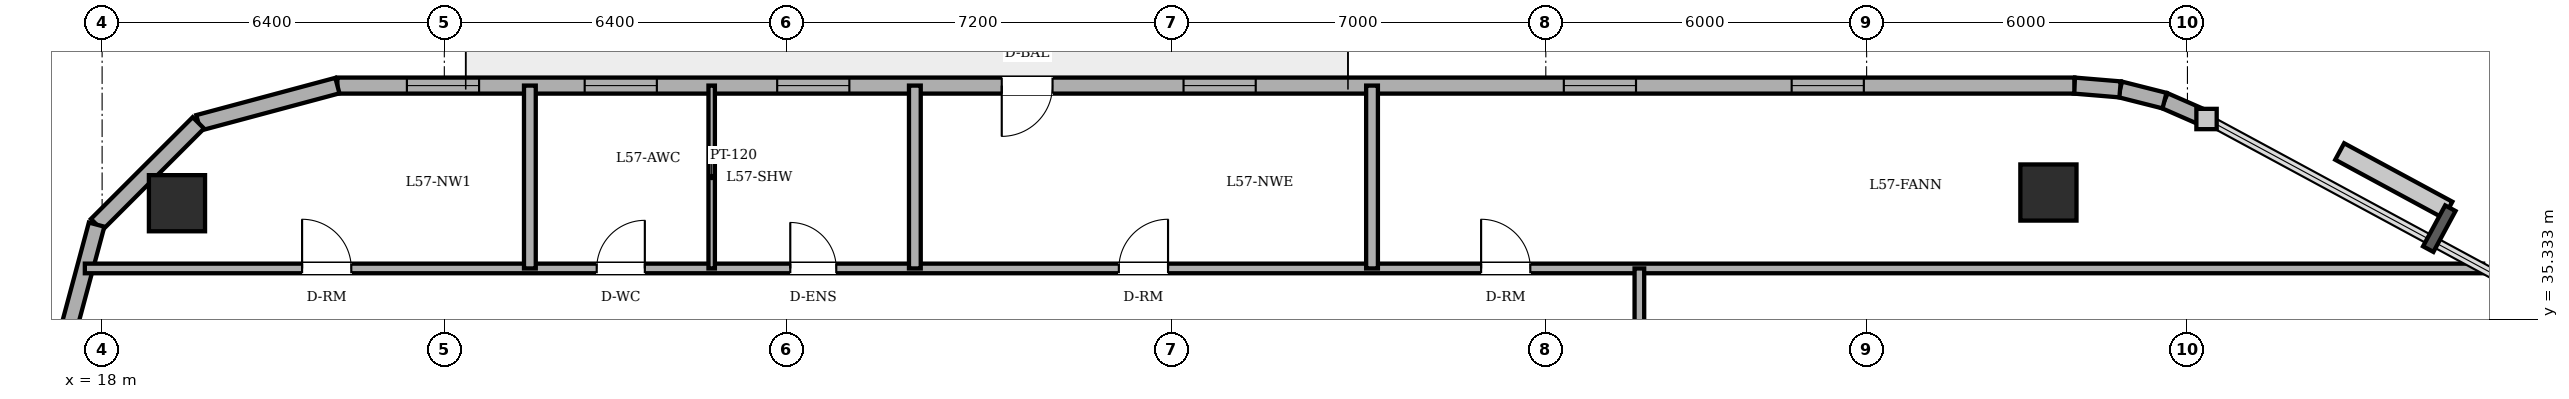
"""IFC4 building model, lengths in metres.
Left out: names, types, materials, properties, quantities, classifications, styles, units other than length and angle.
Written with IfcOpenShell. Run it as: python <this file> out.ifc"""

import sys

from ifc_helpers import new_model, si_unit, direction, frame, frame_2d, origin, origin_2d, place, context, subcontext, project, spatial, rectangle, circle, extrude, element, fill, save


model = new_model("IFC4")
c1 = context("Model", 3, precision=1e-05, world=origin(), true_north=direction((0.0, 1.0)))
c2 = subcontext(c1, "Body", "Model", "MODEL_VIEW")
j1 = project(units=[si_unit("LENGTHUNIT", "METRE"), si_unit("PLANEANGLEUNIT", "RADIAN")], contexts=[c1])
p1 = place(None, origin())
s1 = spatial("IfcSite", under=j1, at=p1, CompositionType="ELEMENT")
p2 = place(p1, origin())
s2 = spatial("IfcBuilding", under=s1, at=p2, CompositionType="ELEMENT")
p3 = place(p2, frame((0.0, 0.0, 219.3)))
s3 = spatial("IfcBuildingStorey", under=s2, at=p3, CompositionType="ELEMENT", Elevation=219.3)
for number, where, z_axis, x_axis in (
    (1, (54.4, 37.7, 0.0), (0.0, 0.0, 1.0), (1.0, 0.0, 0.0)),
    (2, (19.4, 37.5, 0.0), (0.0, 0.0, 1.0), (1.0, 0.0, 0.0)),
):
    element("IfcColumn", number, at=place(p3, frame(where, z_axis=z_axis, x_axis=x_axis)), inside=s3, PredefinedType="COLUMN", context=c2, shape_type="SweptSolid", body=[
        extrude(circle(Radius=0.525, at=origin_2d()), origin(), (0.0, 0.0, 1.0), 3.6),
    ])
p4 = place(p3, frame((57.357, 39.075, 0.0), z_axis=(0.0, 0.0, 1.0), x_axis=(-0.916085473636, 0.400983048261, 0.0)))
e3 = element("IfcWall", 3, at=p4, inside=s3, PredefinedType="SOLIDWALL", context=c2, shape_type="SweptSolid", body=[
    extrude(rectangle(XDim=0.858, YDim=0.3, at=frame_2d((0.429, 0.0))), origin(), (0.0, 0.0, 1.0), 3.4),
])
p5 = place(p3, frame((56.571, 39.419, 0.0), z_axis=(0.0, 0.0, 1.0), x_axis=(-0.969536346338, 0.244947490555, 0.0)))
e4 = element("IfcWall", 4, at=p5, inside=s3, PredefinedType="SOLIDWALL", context=c2, shape_type="SweptSolid", body=[
    extrude(rectangle(XDim=0.857, YDim=0.3, at=frame_2d((0.429, 0.0))), origin(), (0.0, 0.0, 1.0), 3.4),
])
p6 = place(p3, frame((55.74, 39.629, 0.0), z_axis=(0.0, 0.0, 1.0), x_axis=(-0.996565355958, 0.082809971041, 0.0)))
e5 = element("IfcWall", 5, at=p6, inside=s3, PredefinedType="SOLIDWALL", context=c2, shape_type="SweptSolid", body=[
    extrude(rectangle(XDim=0.858, YDim=0.3, at=frame_2d((0.429, 0.0))), origin(), (0.0, 0.0, 1.0), 3.4),
])
p7 = place(p3, frame((54.885, 39.7, 0.0), z_axis=(0.0, 0.0, 1.0), x_axis=(-1.0, 0.0, 0.0)))
e6 = element("IfcWall", 6, at=p7, inside=s3, PredefinedType="SOLIDWALL", context=c2, shape_type="SweptSolid", body=[
    extrude(rectangle(XDim=32.485, YDim=0.3, at=frame_2d((16.243, 0.0))), origin(), (0.0, 0.0, 1.0), 3.4),
])
p8 = place(p7, frame((19.11, 0.0, 0.0)))
e7 = element("IfcOpeningElement", 7, at=p8, cuts=e6, PredefinedType="OPENING", context=c2, shape_type="SweptSolid", body=[
    extrude(rectangle(XDim=0.95, YDim=2.2, at=frame_2d((0.475, 1.1))), frame((0.0, 0.16, 0.0), z_axis=(0.0, -1.0, 0.0), x_axis=(1.0, 0.0, 0.0)), (0.0, 0.0, 1.0), 0.32),
])
p9 = place(p7, frame((3.937, 0.0, 0.85)))
e8 = element("IfcOpeningElement", 8, at=p9, cuts=e6, PredefinedType="OPENING", context=c2, shape_type="SweptSolid", body=[
    extrude(rectangle(XDim=1.35, YDim=1.55, at=frame_2d((0.675, 0.775))), frame((0.0, 0.16, 0.0), z_axis=(0.0, -1.0, 0.0), x_axis=(1.0, 0.0, 0.0)), (0.0, 0.0, 1.0), 0.32),
])
p10 = place(p7, frame((8.198, 0.0, 0.85)))
e9 = element("IfcOpeningElement", 9, at=p10, cuts=e6, PredefinedType="OPENING", context=c2, shape_type="SweptSolid", body=[
    extrude(rectangle(XDim=1.35, YDim=1.55, at=frame_2d((0.675, 0.775))), frame((0.0, 0.16, 0.0), z_axis=(0.0, -1.0, 0.0), x_axis=(1.0, 0.0, 0.0)), (0.0, 0.0, 1.0), 0.32),
])
p11 = place(p7, frame((15.31, 0.0, 0.85)))
e10 = element("IfcOpeningElement", 10, at=p11, cuts=e6, PredefinedType="OPENING", context=c2, shape_type="SweptSolid", body=[
    extrude(rectangle(XDim=1.35, YDim=1.55, at=frame_2d((0.675, 0.775))), frame((0.0, 0.16, 0.0), z_axis=(0.0, -1.0, 0.0), x_axis=(1.0, 0.0, 0.0)), (0.0, 0.0, 1.0), 0.32),
])
p12 = place(p7, frame((22.91, 0.0, 0.85)))
e11 = element("IfcOpeningElement", 11, at=p12, cuts=e6, PredefinedType="OPENING", context=c2, shape_type="SweptSolid", body=[
    extrude(rectangle(XDim=1.35, YDim=1.55, at=frame_2d((0.675, 0.775))), frame((0.0, 0.16, 0.0), z_axis=(0.0, -1.0, 0.0), x_axis=(1.0, 0.0, 0.0)), (0.0, 0.0, 1.0), 0.32),
])
p13 = place(p7, frame((26.51, 0.0, 0.85)))
e12 = element("IfcOpeningElement", 12, at=p13, cuts=e6, PredefinedType="OPENING", context=c2, shape_type="SweptSolid", body=[
    extrude(rectangle(XDim=1.35, YDim=1.55, at=frame_2d((0.675, 0.775))), frame((0.0, 0.16, 0.0), z_axis=(0.0, -1.0, 0.0), x_axis=(1.0, 0.0, 0.0)), (0.0, 0.0, 1.0), 0.32),
])
p14 = place(p7, frame((29.835, 0.0, 0.85)))
e13 = element("IfcOpeningElement", 13, at=p14, cuts=e6, PredefinedType="OPENING", context=c2, shape_type="SweptSolid", body=[
    extrude(rectangle(XDim=1.35, YDim=1.55, at=frame_2d((0.675, 0.775))), frame((0.0, 0.16, 0.0), z_axis=(0.0, -1.0, 0.0), x_axis=(1.0, 0.0, 0.0)), (0.0, 0.0, 1.0), 0.32),
])
p15 = place(p3, frame((22.4, 39.7, 0.0), z_axis=(0.0, 0.0, 1.0), x_axis=(-0.965889330541, -0.258955210695, 0.0)))
e14 = element("IfcWall", 14, at=p15, inside=s3, PredefinedType="SOLIDWALL", context=c2, shape_type="SweptSolid", body=[
    extrude(rectangle(XDim=2.692, YDim=0.3, at=frame_2d((1.346, 0.0))), origin(), (0.0, 0.0, 1.0), 3.4),
])
p16 = place(p3, frame((19.8, 39.003, 0.0), z_axis=(0.0, 0.0, 1.0), x_axis=(-0.707152139074, -0.70706142039, 0.0)))
e15 = element("IfcWall", 15, at=p16, inside=s3, PredefinedType="SOLIDWALL", context=c2, shape_type="SweptSolid", body=[
    extrude(rectangle(XDim=2.691, YDim=0.3, at=frame_2d((1.346, 0.0))), origin(), (0.0, 0.0, 1.0), 3.4),
])
p17 = place(p3, frame((17.897, 37.1, 0.0), z_axis=(0.0, 0.0, 1.0), x_axis=(-0.258932525951, -0.965895412042, 0.0)))
e16 = element("IfcWall", 16, at=p17, inside=s3, PredefinedType="SOLIDWALL", context=c2, shape_type="SweptSolid", body=[
    extrude(rectangle(XDim=2.692, YDim=0.3, at=frame_2d((1.346, 0.0))), origin(), (0.0, 0.0, 1.0), 3.4),
])
p18 = place(p3, frame((17.677, 36.28, 0.0), z_axis=(0.0, 0.0, 1.0), x_axis=(1.0, 0.0, 0.0)))
e17 = element("IfcWall", 17, at=p18, inside=s3, PredefinedType="PARTITIONING", context=c2, shape_type="SweptSolid", body=[
    extrude(rectangle(XDim=44.853, YDim=0.18, at=frame_2d((22.427, 0.0))), origin(), (0.0, 0.0, 1.0), 3.4),
])
p19 = place(p18, frame((9.573, 0.0, 0.0)))
e18 = element("IfcOpeningElement", 18, at=p19, cuts=e17, PredefinedType="OPENING", context=c2, shape_type="SweptSolid", body=[
    extrude(rectangle(XDim=0.9, YDim=2.1, at=frame_2d((0.45, 1.05))), frame((0.0, 0.1, 0.0), z_axis=(0.0, -1.0, 0.0), x_axis=(1.0, 0.0, 0.0)), (0.0, 0.0, 1.0), 0.2),
])
p20 = place(p18, frame((13.193, 0.0, 0.0)))
e19 = element("IfcOpeningElement", 19, at=p20, cuts=e17, PredefinedType="OPENING", context=c2, shape_type="SweptSolid", body=[
    extrude(rectangle(XDim=0.86, YDim=2.1, at=frame_2d((0.43, 1.05))), frame((0.0, 0.1, 0.0), z_axis=(0.0, -1.0, 0.0), x_axis=(1.0, 0.0, 0.0)), (0.0, 0.0, 1.0), 0.2),
])
p21 = place(p18, frame((26.113, 0.0, 0.0)))
e20 = element("IfcOpeningElement", 20, at=p21, cuts=e17, PredefinedType="OPENING", context=c2, shape_type="SweptSolid", body=[
    extrude(rectangle(XDim=0.92, YDim=2.1, at=frame_2d((0.46, 1.05))), frame((0.0, 0.1, 0.0), z_axis=(0.0, -1.0, 0.0), x_axis=(1.0, 0.0, 0.0)), (0.0, 0.0, 1.0), 0.2),
])
p22 = place(p18, frame((4.063, 0.0, 0.0)))
e21 = element("IfcOpeningElement", 21, at=p22, cuts=e17, PredefinedType="OPENING", context=c2, shape_type="SweptSolid", body=[
    extrude(rectangle(XDim=0.92, YDim=2.1, at=frame_2d((0.46, 1.05))), frame((0.0, 0.1, 0.0), z_axis=(0.0, -1.0, 0.0), x_axis=(1.0, 0.0, 0.0)), (0.0, 0.0, 1.0), 0.2),
])
p23 = place(p18, frame((19.338, 0.0, 0.0)))
e22 = element("IfcOpeningElement", 22, at=p23, cuts=e17, PredefinedType="OPENING", context=c2, shape_type="SweptSolid", body=[
    extrude(rectangle(XDim=0.92, YDim=2.1, at=frame_2d((0.46, 1.05))), frame((0.0, 0.1, 0.0), z_axis=(0.0, -1.0, 0.0), x_axis=(1.0, 0.0, 0.0)), (0.0, 0.0, 1.0), 0.2),
])
p24 = place(p3, frame((26.0, 36.28, 0.0), z_axis=(0.0, 0.0, 1.0), x_axis=(0.0, 1.0, 0.0)))
e23 = element("IfcWall", 23, at=p24, inside=s3, PredefinedType="PARTITIONING", context=c2, shape_type="SweptSolid", body=[
    extrude(rectangle(XDim=3.42, YDim=0.22, at=frame_2d((1.71, 0.0))), origin(), (0.0, 0.0, 1.0), 3.4),
])
p25 = place(p3, frame((29.4, 36.28, 0.0), z_axis=(0.0, 0.0, 1.0), x_axis=(0.0, 1.0, 0.0)))
e24 = element("IfcWall", 24, at=p25, inside=s3, PredefinedType="PARTITIONING", context=c2, shape_type="SweptSolid", body=[
    extrude(rectangle(XDim=3.42, YDim=0.12, at=frame_2d((1.71, 0.0))), origin(), (0.0, 0.0, 1.0), 3.4),
])
for number, where, z_axis, x_axis in (
    (25, (33.2, 36.28, 0.0), (0.0, 0.0, 1.0), (0.0, 1.0, 0.0)),
    (26, (41.75, 36.28, 0.0), (0.0, 0.0, 1.0), (0.0, 1.0, 0.0)),
):
    element("IfcWall", number, at=place(p3, frame(where, z_axis=z_axis, x_axis=x_axis)), inside=s3, PredefinedType="PARTITIONING", context=c2, shape_type="SweptSolid", body=[
        extrude(rectangle(XDim=3.42, YDim=0.22, at=frame_2d((1.71, 0.0))), origin(), (0.0, 0.0, 1.0), 3.4),
    ])
p26 = place(p3, frame((46.75, 33.82, 0.0), z_axis=(0.0, 0.0, 1.0), x_axis=(0.0, 1.0, 0.0)))
e27 = element("IfcWall", 27, at=p26, inside=s3, PredefinedType="PARTITIONING", context=c2, shape_type="SweptSolid", body=[
    extrude(rectangle(XDim=2.46, YDim=0.18, at=frame_2d((1.23, 0.0))), origin(), (0.0, 0.0, 1.0), 3.4),
])
p27 = place(p8, origin())
e28 = element("IfcDoor", 28, at=p27, inside=s3, OperationType="SINGLE_SWING_RIGHT", PredefinedType="DOOR", context=c2, shape_type="SweptSolid", body=[
    extrude(rectangle(XDim=0.95, YDim=2.2, at=frame_2d((0.475, 1.1))), frame((0.0, 0.025, 0.0), z_axis=(0.0, -1.0, 0.0), x_axis=(1.0, 0.0, 0.0)), (0.0, 0.0, 1.0), 0.05),
])
fill(e7, e28)
p28 = place(p9, origin())
e29 = element("IfcWindow", 29, at=p28, inside=s3, PartitioningType="SINGLE_PANEL", PredefinedType="WINDOW", context=c2, shape_type="SweptSolid", body=[
    extrude(rectangle(XDim=1.35, YDim=1.55, at=frame_2d((0.675, 0.775))), frame((0.0, 0.03, 0.0), z_axis=(0.0, -1.0, 0.0), x_axis=(1.0, 0.0, 0.0)), (0.0, 0.0, 1.0), 0.06),
])
fill(e8, e29)
p29 = place(p10, origin())
e30 = element("IfcWindow", 30, at=p29, inside=s3, PartitioningType="SINGLE_PANEL", PredefinedType="WINDOW", context=c2, shape_type="SweptSolid", body=[
    extrude(rectangle(XDim=1.35, YDim=1.55, at=frame_2d((0.675, 0.775))), frame((0.0, 0.03, 0.0), z_axis=(0.0, -1.0, 0.0), x_axis=(1.0, 0.0, 0.0)), (0.0, 0.0, 1.0), 0.06),
])
fill(e9, e30)
p30 = place(p11, origin())
e31 = element("IfcWindow", 31, at=p30, inside=s3, PartitioningType="SINGLE_PANEL", PredefinedType="WINDOW", context=c2, shape_type="SweptSolid", body=[
    extrude(rectangle(XDim=1.35, YDim=1.55, at=frame_2d((0.675, 0.775))), frame((0.0, 0.03, 0.0), z_axis=(0.0, -1.0, 0.0), x_axis=(1.0, 0.0, 0.0)), (0.0, 0.0, 1.0), 0.06),
])
fill(e10, e31)
p31 = place(p12, origin())
e32 = element("IfcWindow", 32, at=p31, inside=s3, PartitioningType="SINGLE_PANEL", PredefinedType="WINDOW", context=c2, shape_type="SweptSolid", body=[
    extrude(rectangle(XDim=1.35, YDim=1.55, at=frame_2d((0.675, 0.775))), frame((0.0, 0.03, 0.0), z_axis=(0.0, -1.0, 0.0), x_axis=(1.0, 0.0, 0.0)), (0.0, 0.0, 1.0), 0.06),
])
fill(e11, e32)
p32 = place(p13, origin())
e33 = element("IfcWindow", 33, at=p32, inside=s3, PartitioningType="SINGLE_PANEL", PredefinedType="WINDOW", context=c2, shape_type="SweptSolid", body=[
    extrude(rectangle(XDim=1.35, YDim=1.55, at=frame_2d((0.675, 0.775))), frame((0.0, 0.03, 0.0), z_axis=(0.0, -1.0, 0.0), x_axis=(1.0, 0.0, 0.0)), (0.0, 0.0, 1.0), 0.06),
])
fill(e12, e33)
p33 = place(p14, origin())
e34 = element("IfcWindow", 34, at=p33, inside=s3, PartitioningType="SINGLE_PANEL", PredefinedType="WINDOW", context=c2, shape_type="SweptSolid", body=[
    extrude(rectangle(XDim=1.35, YDim=1.55, at=frame_2d((0.675, 0.775))), frame((0.0, 0.03, 0.0), z_axis=(0.0, -1.0, 0.0), x_axis=(1.0, 0.0, 0.0)), (0.0, 0.0, 1.0), 0.06),
])
fill(e13, e34)
p34 = place(p19, origin())
e35 = element("IfcDoor", 35, at=p34, inside=s3, OperationType="SINGLE_SWING_RIGHT", PredefinedType="DOOR", context=c2, shape_type="SweptSolid", body=[
    extrude(rectangle(XDim=0.9, YDim=2.1, at=frame_2d((0.45, 1.05))), frame((0.0, 0.025, 0.0), z_axis=(0.0, -1.0, 0.0), x_axis=(1.0, 0.0, 0.0)), (0.0, 0.0, 1.0), 0.05),
])
fill(e18, e35)
p35 = place(p20, origin())
e36 = element("IfcDoor", 36, at=p35, inside=s3, OperationType="SINGLE_SWING_LEFT", PredefinedType="DOOR", context=c2, shape_type="SweptSolid", body=[
    extrude(rectangle(XDim=0.86, YDim=2.1, at=frame_2d((0.43, 1.05))), frame((0.0, 0.025, 0.0), z_axis=(0.0, -1.0, 0.0), x_axis=(1.0, 0.0, 0.0)), (0.0, 0.0, 1.0), 0.05),
])
fill(e19, e36)
p36 = place(p21, origin())
e37 = element("IfcDoor", 37, at=p36, inside=s3, OperationType="SINGLE_SWING_LEFT", PredefinedType="DOOR", context=c2, shape_type="SweptSolid", body=[
    extrude(rectangle(XDim=0.92, YDim=2.1, at=frame_2d((0.46, 1.05))), frame((0.0, 0.025, 0.0), z_axis=(0.0, -1.0, 0.0), x_axis=(1.0, 0.0, 0.0)), (0.0, 0.0, 1.0), 0.05),
])
fill(e20, e37)
p37 = place(p22, origin())
e38 = element("IfcDoor", 38, at=p37, inside=s3, OperationType="SINGLE_SWING_LEFT", PredefinedType="DOOR", context=c2, shape_type="SweptSolid", body=[
    extrude(rectangle(XDim=0.92, YDim=2.1, at=frame_2d((0.46, 1.05))), frame((0.0, 0.025, 0.0), z_axis=(0.0, -1.0, 0.0), x_axis=(1.0, 0.0, 0.0)), (0.0, 0.0, 1.0), 0.05),
])
fill(e21, e38)
p38 = place(p23, origin())
e39 = element("IfcDoor", 39, at=p38, inside=s3, OperationType="SINGLE_SWING_RIGHT", PredefinedType="DOOR", context=c2, shape_type="SweptSolid", body=[
    extrude(rectangle(XDim=0.92, YDim=2.1, at=frame_2d((0.46, 1.05))), frame((0.0, 0.025, 0.0), z_axis=(0.0, -1.0, 0.0), x_axis=(1.0, 0.0, 0.0)), (0.0, 0.0, 1.0), 0.05),
])
fill(e22, e39)
save(model, sys.argv[1])
